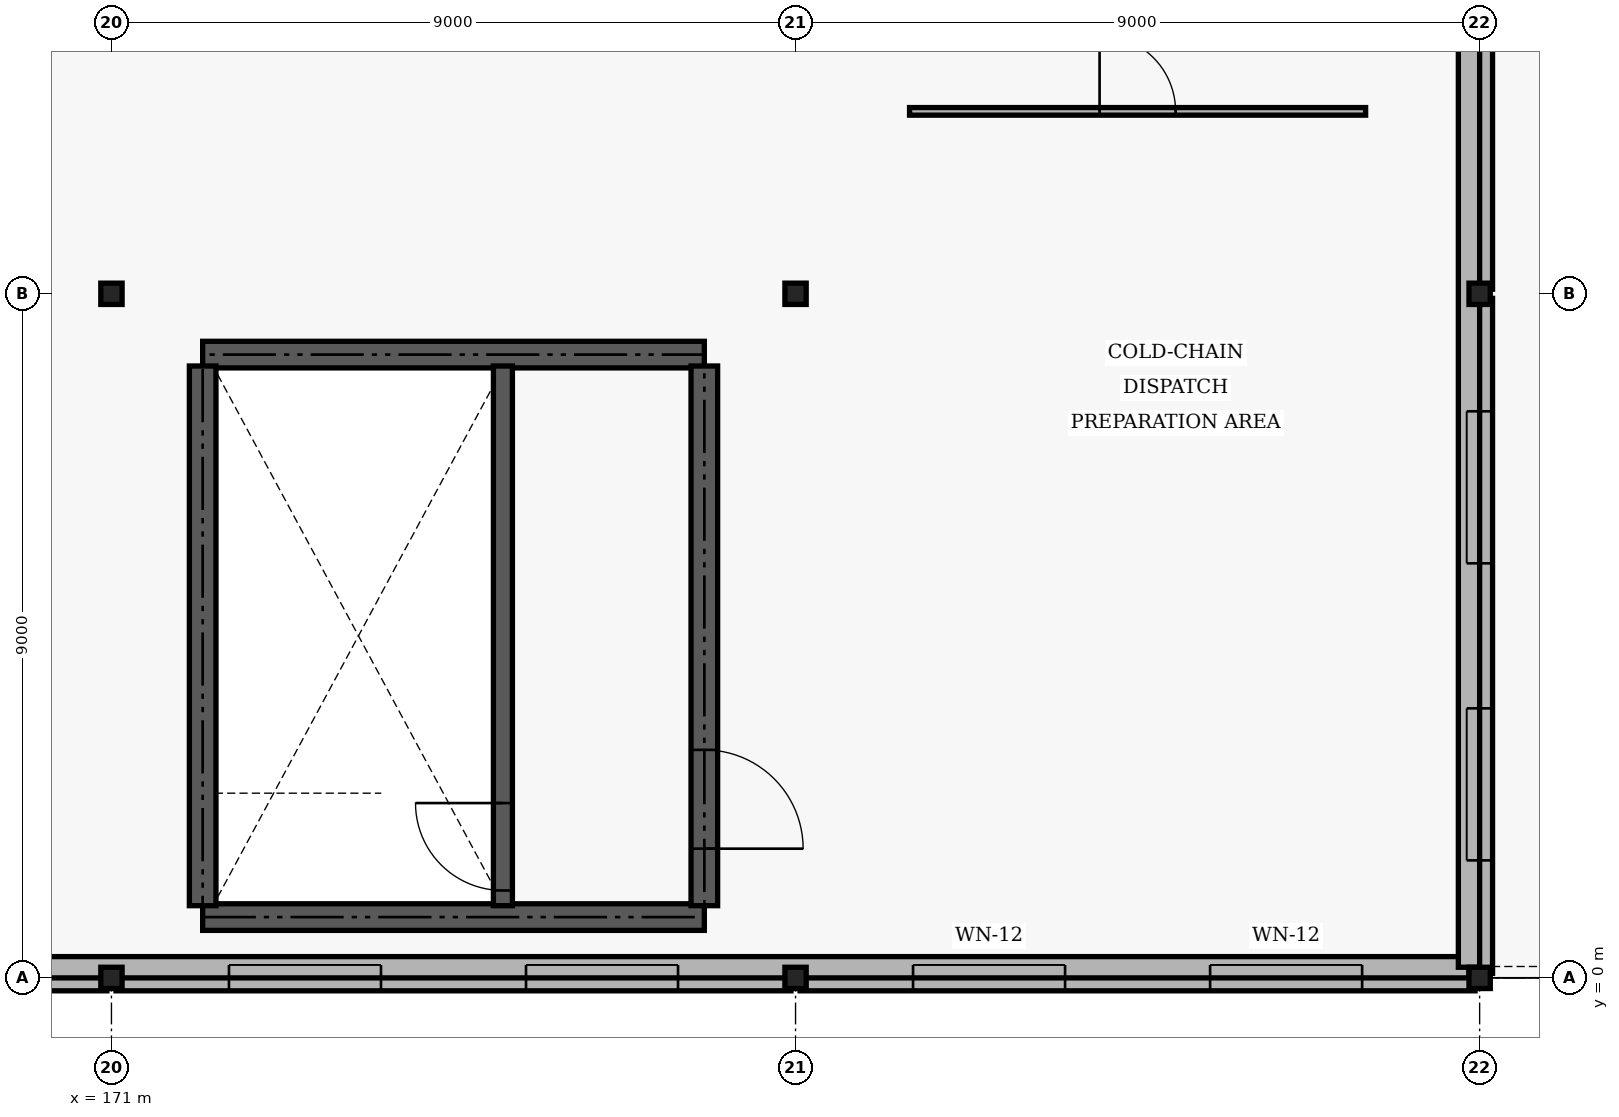
"""IFC4 building model, lengths in metres.
Left out: names, types, materials, properties, quantities, classifications, styles, units other than length and angle.
Written with IfcOpenShell. Run it as: python <this file> out.ifc"""

import sys

from ifc_helpers import new_model, si_unit, direction, frame, frame_2d, origin, origin_2d, place, context, subcontext, project, spatial, rectangle, i_section, extrude, element, fill, save


model = new_model("IFC4")
c1 = context("Model", 3, precision=1e-05, world=origin(), true_north=direction((0.0, 1.0)))
c2 = subcontext(c1, "Body", "Model", "MODEL_VIEW")
j1 = project(units=[si_unit("LENGTHUNIT", "METRE"), si_unit("PLANEANGLEUNIT", "RADIAN")], contexts=[c1])
p1 = place(None, origin())
s1 = spatial("IfcSite", under=j1, at=p1, CompositionType="ELEMENT")
p2 = place(p1, origin())
s2 = spatial("IfcBuilding", under=s1, at=p2, CompositionType="ELEMENT")
p3 = place(p2, frame((0.0, 0.0, 13.5)))
s3 = spatial("IfcBuildingStorey", under=s2, at=p3, CompositionType="ELEMENT", Elevation=13.5)
for number, where, z_axis, x_axis in (
    (1, (171.0, 0.0, 0.0), (0.0, 0.0, 1.0), (1.0, 0.0, 0.0)),
    (2, (171.0, 9.0, 0.0), (0.0, 0.0, 1.0), (1.0, 0.0, 0.0)),
    (3, (180.0, 0.0, 0.0), (0.0, 0.0, 1.0), (1.0, 0.0, 0.0)),
    (4, (180.0, 9.0, 0.0), (0.0, 0.0, 1.0), (1.0, 0.0, 0.0)),
    (5, (189.0, 0.0, 0.0), (0.0, 0.0, 1.0), (1.0, 0.0, 0.0)),
    (6, (189.0, 9.0, 0.0), (0.0, 0.0, 1.0), (1.0, 0.0, 0.0)),
):
    element("IfcColumn", number, at=place(p3, frame(where, z_axis=z_axis, x_axis=x_axis)), inside=s3, PredefinedType="COLUMN", context=c2, shape_type="SweptSolid", body=[
        extrude(i_section(OverallWidth=0.28, OverallDepth=0.28, WebThickness=0.01, FlangeThickness=0.018, FilletRadius=0.024, at=origin_2d()), origin(), (0.0, 0.0, 1.0), 3.9),
    ])
p4 = place(p3, frame((162.06, 0.0, 0.0), z_axis=(0.0, 0.0, 1.0), x_axis=(1.0, 0.0, 0.0)))
e7 = element("IfcWall", 7, at=p4, inside=s3, PredefinedType="SOLIDWALL", context=c2, shape_type="SweptSolid", body=[
    extrude(rectangle(XDim=8.88, YDim=0.34, at=frame_2d((4.44, 0.0))), origin(), (0.0, 0.0, 1.0), 3.2),
])
p5 = place(p4, frame((1.486, 0.0, 0.9)))
e8 = element("IfcOpeningElement", 8, at=p5, cuts=e7, PredefinedType="OPENING", context=c2, shape_type="SweptSolid", body=[
    extrude(rectangle(XDim=2.0, YDim=1.5, at=frame_2d((1.0, 0.75))), frame((0.0, 0.18, 0.0), z_axis=(0.0, -1.0, 0.0), x_axis=(1.0, 0.0, 0.0)), (0.0, 0.0, 1.0), 0.36),
])
p6 = place(p4, frame((5.394, 0.0, 0.9)))
e9 = element("IfcOpeningElement", 9, at=p6, cuts=e7, PredefinedType="OPENING", context=c2, shape_type="SweptSolid", body=[
    extrude(rectangle(XDim=2.0, YDim=1.5, at=frame_2d((1.0, 0.75))), frame((0.0, 0.18, 0.0), z_axis=(0.0, -1.0, 0.0), x_axis=(1.0, 0.0, 0.0)), (0.0, 0.0, 1.0), 0.36),
])
p7 = place(p3, frame((171.06, 0.0, 0.0), z_axis=(0.0, 0.0, 1.0), x_axis=(1.0, 0.0, 0.0)))
e10 = element("IfcWall", 10, at=p7, inside=s3, PredefinedType="SOLIDWALL", context=c2, shape_type="SweptSolid", body=[
    extrude(rectangle(XDim=8.88, YDim=0.34, at=frame_2d((4.44, 0.0))), origin(), (0.0, 0.0, 1.0), 3.2),
])
p8 = place(p7, frame((1.486, 0.0, 0.9)))
e11 = element("IfcOpeningElement", 11, at=p8, cuts=e10, PredefinedType="OPENING", context=c2, shape_type="SweptSolid", body=[
    extrude(rectangle(XDim=2.0, YDim=1.5, at=frame_2d((1.0, 0.75))), frame((0.0, 0.18, 0.0), z_axis=(0.0, -1.0, 0.0), x_axis=(1.0, 0.0, 0.0)), (0.0, 0.0, 1.0), 0.36),
])
p9 = place(p7, frame((5.394, 0.0, 0.9)))
e12 = element("IfcOpeningElement", 12, at=p9, cuts=e10, PredefinedType="OPENING", context=c2, shape_type="SweptSolid", body=[
    extrude(rectangle(XDim=2.0, YDim=1.5, at=frame_2d((1.0, 0.75))), frame((0.0, 0.18, 0.0), z_axis=(0.0, -1.0, 0.0), x_axis=(1.0, 0.0, 0.0)), (0.0, 0.0, 1.0), 0.36),
])
p10 = place(p3, frame((180.06, 0.0, 0.0), z_axis=(0.0, 0.0, 1.0), x_axis=(1.0, 0.0, 0.0)))
e13 = element("IfcWall", 13, at=p10, inside=s3, PredefinedType="SOLIDWALL", context=c2, shape_type="SweptSolid", body=[
    extrude(rectangle(XDim=8.88, YDim=0.34, at=frame_2d((4.44, 0.0))), origin(), (0.0, 0.0, 1.0), 3.2),
])
p11 = place(p10, frame((1.486, 0.0, 0.9)))
e14 = element("IfcOpeningElement", 14, at=p11, cuts=e13, PredefinedType="OPENING", context=c2, shape_type="SweptSolid", body=[
    extrude(rectangle(XDim=2.0, YDim=1.5, at=frame_2d((1.0, 0.75))), frame((0.0, 0.18, 0.0), z_axis=(0.0, -1.0, 0.0), x_axis=(1.0, 0.0, 0.0)), (0.0, 0.0, 1.0), 0.36),
])
p12 = place(p10, frame((5.394, 0.0, 0.9)))
e15 = element("IfcOpeningElement", 15, at=p12, cuts=e13, PredefinedType="OPENING", context=c2, shape_type="SweptSolid", body=[
    extrude(rectangle(XDim=2.0, YDim=1.5, at=frame_2d((1.0, 0.75))), frame((0.0, 0.18, 0.0), z_axis=(0.0, -1.0, 0.0), x_axis=(1.0, 0.0, 0.0)), (0.0, 0.0, 1.0), 0.36),
])
p13 = place(p3, frame((189.0, 0.06, 0.0), z_axis=(0.0, 0.0, 1.0), x_axis=(0.0, 1.0, 0.0)))
e16 = element("IfcWall", 16, at=p13, inside=s3, PredefinedType="SOLIDWALL", context=c2, shape_type="SweptSolid", body=[
    extrude(rectangle(XDim=8.88, YDim=0.34, at=frame_2d((4.44, 0.0))), origin(), (0.0, 0.0, 1.0), 3.2),
])
p14 = place(p13, frame((1.486, 0.0, 0.9)))
e17 = element("IfcOpeningElement", 17, at=p14, cuts=e16, PredefinedType="OPENING", context=c2, shape_type="SweptSolid", body=[
    extrude(rectangle(XDim=2.0, YDim=2.4, at=frame_2d((1.0, 1.2))), frame((0.0, 0.18, 0.0), z_axis=(0.0, -1.0, 0.0), x_axis=(1.0, 0.0, 0.0)), (0.0, 0.0, 1.0), 0.36),
])
p15 = place(p13, frame((5.394, 0.0, 0.9)))
e18 = element("IfcOpeningElement", 18, at=p15, cuts=e16, PredefinedType="OPENING", context=c2, shape_type="SweptSolid", body=[
    extrude(rectangle(XDim=2.0, YDim=2.4, at=frame_2d((1.0, 1.2))), frame((0.0, 0.18, 0.0), z_axis=(0.0, -1.0, 0.0), x_axis=(1.0, 0.0, 0.0)), (0.0, 0.0, 1.0), 0.36),
])
p16 = place(p3, frame((189.0, 9.06, 0.0), z_axis=(0.0, 0.0, 1.0), x_axis=(0.0, 1.0, 0.0)))
e19 = element("IfcWall", 19, at=p16, inside=s3, PredefinedType="SOLIDWALL", context=c2, shape_type="SweptSolid", body=[
    extrude(rectangle(XDim=8.88, YDim=0.34, at=frame_2d((4.44, 0.0))), origin(), (0.0, 0.0, 1.0), 3.2),
])
p17 = place(p16, frame((3.84, 0.0, 0.0)))
e20 = element("IfcOpeningElement", 20, at=p17, cuts=e19, PredefinedType="OPENING", context=c2, shape_type="SweptSolid", body=[
    extrude(rectangle(XDim=1.2, YDim=2.15, at=frame_2d((0.6, 1.075))), frame((0.0, 0.18, 0.0), z_axis=(0.0, -1.0, 0.0), x_axis=(1.0, 0.0, 0.0)), (0.0, 0.0, 1.0), 0.36),
])
p18 = place(p3, frame((135.14, 0.14, 3.9), z_axis=(0.0, 0.0, 1.0), x_axis=(1.0, 0.0, 0.0)))
e21 = element("IfcWall", 21, at=p18, inside=s3, PredefinedType="PARAPET", context=c2, shape_type="SweptSolid", body=[
    extrude(rectangle(XDim=53.72, YDim=0.28, at=frame_2d((26.86, 0.0))), origin(), (0.0, 0.0, 1.0), 1.2),
])
p19 = place(p3, frame((188.86, 0.14, 3.9), z_axis=(0.0, 0.0, 1.0), x_axis=(0.0, 1.0, 0.0)))
e22 = element("IfcWall", 22, at=p19, inside=s3, PredefinedType="PARAPET", context=c2, shape_type="SweptSolid", body=[
    extrude(rectangle(XDim=17.72, YDim=0.28, at=frame_2d((8.86, 0.0))), origin(), (0.0, 0.0, 1.0), 1.2),
])
for number, where, z_axis, x_axis in (
    (23, (172.2, 0.8, 0.0), (0.0, 0.0, 1.0), (1.0, 0.0, 0.0)),
    (24, (172.2, 8.2, 0.0), (0.0, 0.0, 1.0), (1.0, 0.0, 0.0)),
):
    element("IfcWall", number, at=place(p3, frame(where, z_axis=z_axis, x_axis=x_axis)), inside=s3, PredefinedType="SHEAR", context=c2, shape_type="SweptSolid", body=[
        extrude(rectangle(XDim=6.6, YDim=0.35, at=frame_2d((3.3, 0.0))), origin(), (0.0, 0.0, 1.0), 3.7),
    ])
p20 = place(p3, frame((172.2, 0.95, 0.0), z_axis=(0.0, 0.0, 1.0), x_axis=(0.0, 1.0, 0.0)))
e25 = element("IfcWall", 25, at=p20, inside=s3, PredefinedType="SHEAR", context=c2, shape_type="SweptSolid", body=[
    extrude(rectangle(XDim=7.1, YDim=0.35, at=frame_2d((3.55, 0.0))), origin(), (0.0, 0.0, 1.0), 3.7),
])
p21 = place(p3, frame((178.8, 0.95, 0.0), z_axis=(0.0, 0.0, 1.0), x_axis=(0.0, 1.0, 0.0)))
e26 = element("IfcWall", 26, at=p21, inside=s3, PredefinedType="SHEAR", context=c2, shape_type="SweptSolid", body=[
    extrude(rectangle(XDim=7.1, YDim=0.35, at=frame_2d((3.55, 0.0))), origin(), (0.0, 0.0, 1.0), 3.7),
])
p22 = place(p21, frame((0.75, 0.0, 0.0)))
e27 = element("IfcOpeningElement", 27, at=p22, cuts=e26, PredefinedType="OPENING", context=c2, shape_type="SweptSolid", body=[
    extrude(rectangle(XDim=1.3, YDim=2.15, at=frame_2d((0.65, 1.075))), frame((0.0, 0.185, 0.0), z_axis=(0.0, -1.0, 0.0), x_axis=(1.0, 0.0, 0.0)), (0.0, 0.0, 1.0), 0.37),
])
p23 = place(p3, frame((176.15, 0.95, 0.0), z_axis=(0.0, 0.0, 1.0), x_axis=(0.0, 1.0, 0.0)))
e28 = element("IfcWall", 28, at=p23, inside=s3, PredefinedType="SHEAR", context=c2, shape_type="SweptSolid", body=[
    extrude(rectangle(XDim=7.1, YDim=0.25, at=frame_2d((3.55, 0.0))), origin(), (0.0, 0.0, 1.0), 3.7),
])
p24 = place(p23, frame((0.2, 0.0, 0.0)))
e29 = element("IfcOpeningElement", 29, at=p24, cuts=e28, PredefinedType="OPENING", context=c2, shape_type="SweptSolid", body=[
    extrude(rectangle(XDim=1.15, YDim=2.15, at=frame_2d((0.575, 1.075))), frame((0.0, 0.135, 0.0), z_axis=(0.0, -1.0, 0.0), x_axis=(1.0, 0.0, 0.0)), (0.0, 0.0, 1.0), 0.27),
])
p25 = place(p3, frame((181.5, 11.4, 0.0), z_axis=(0.0, 0.0, 1.0), x_axis=(1.0, 0.0, 0.0)))
e30 = element("IfcWall", 30, at=p25, inside=s3, PredefinedType="PARTITIONING", context=c2, shape_type="SweptSolid", body=[
    extrude(rectangle(XDim=6.0, YDim=0.1, at=frame_2d((3.0, 0.0))), origin(), (0.0, 0.0, 1.0), 2.9),
])
p26 = place(p25, frame((2.5, 0.0, 0.0)))
e31 = element("IfcOpeningElement", 31, at=p26, cuts=e30, PredefinedType="OPENING", context=c2, shape_type="SweptSolid", body=[
    extrude(rectangle(XDim=1.0, YDim=2.1, at=frame_2d((0.5, 1.05))), frame((0.0, 0.06, 0.0), z_axis=(0.0, -1.0, 0.0), x_axis=(1.0, 0.0, 0.0)), (0.0, 0.0, 1.0), 0.12),
])
p27 = place(p8, origin())
e32 = element("IfcWindow", 32, at=p27, inside=s3, PartitioningType="SINGLE_PANEL", PredefinedType="WINDOW", context=c2, shape_type="SweptSolid", body=[
    extrude(rectangle(XDim=2.0, YDim=1.5, at=frame_2d((1.0, 0.75))), frame((0.0, 0.03, 0.0), z_axis=(0.0, -1.0, 0.0), x_axis=(1.0, 0.0, 0.0)), (0.0, 0.0, 1.0), 0.06),
])
fill(e11, e32)
p28 = place(p9, origin())
e33 = element("IfcWindow", 33, at=p28, inside=s3, PartitioningType="SINGLE_PANEL", PredefinedType="WINDOW", context=c2, shape_type="SweptSolid", body=[
    extrude(rectangle(XDim=2.0, YDim=1.5, at=frame_2d((1.0, 0.75))), frame((0.0, 0.03, 0.0), z_axis=(0.0, -1.0, 0.0), x_axis=(1.0, 0.0, 0.0)), (0.0, 0.0, 1.0), 0.06),
])
fill(e12, e33)
p29 = place(p11, origin())
e34 = element("IfcWindow", 34, at=p29, inside=s3, PartitioningType="SINGLE_PANEL", PredefinedType="WINDOW", context=c2, shape_type="SweptSolid", body=[
    extrude(rectangle(XDim=2.0, YDim=1.5, at=frame_2d((1.0, 0.75))), frame((0.0, 0.03, 0.0), z_axis=(0.0, -1.0, 0.0), x_axis=(1.0, 0.0, 0.0)), (0.0, 0.0, 1.0), 0.06),
])
fill(e14, e34)
p30 = place(p12, origin())
e35 = element("IfcWindow", 35, at=p30, inside=s3, PartitioningType="SINGLE_PANEL", PredefinedType="WINDOW", context=c2, shape_type="SweptSolid", body=[
    extrude(rectangle(XDim=2.0, YDim=1.5, at=frame_2d((1.0, 0.75))), frame((0.0, 0.03, 0.0), z_axis=(0.0, -1.0, 0.0), x_axis=(1.0, 0.0, 0.0)), (0.0, 0.0, 1.0), 0.06),
])
fill(e15, e35)
p31 = place(p14, origin())
e36 = element("IfcWindow", 36, at=p31, inside=s3, PartitioningType="SINGLE_PANEL", PredefinedType="WINDOW", context=c2, shape_type="SweptSolid", body=[
    extrude(rectangle(XDim=2.0, YDim=2.4, at=frame_2d((1.0, 1.2))), frame((0.0, 0.03, 0.0), z_axis=(0.0, -1.0, 0.0), x_axis=(1.0, 0.0, 0.0)), (0.0, 0.0, 1.0), 0.06),
])
fill(e17, e36)
p32 = place(p15, origin())
e37 = element("IfcWindow", 37, at=p32, inside=s3, PartitioningType="SINGLE_PANEL", PredefinedType="WINDOW", context=c2, shape_type="SweptSolid", body=[
    extrude(rectangle(XDim=2.0, YDim=2.4, at=frame_2d((1.0, 1.2))), frame((0.0, 0.03, 0.0), z_axis=(0.0, -1.0, 0.0), x_axis=(1.0, 0.0, 0.0)), (0.0, 0.0, 1.0), 0.06),
])
fill(e18, e37)
p33 = place(p22, frame((1.3, 0.0, 0.0), z_axis=(0.0, 0.0, 1.0), x_axis=(-1.0, 0.0, 0.0)))
e38 = element("IfcDoor", 38, at=p33, inside=s3, OperationType="DOUBLE_DOOR_SINGLE_SWING", PredefinedType="DOOR", context=c2, shape_type="SweptSolid", body=[
    extrude(rectangle(XDim=1.3, YDim=2.15, at=frame_2d((0.65, 1.075))), frame((0.0, 0.025, 0.0), z_axis=(0.0, -1.0, 0.0), x_axis=(1.0, 0.0, 0.0)), (0.0, 0.0, 1.0), 0.05),
])
fill(e27, e38)
p34 = place(p24, frame((1.15, 0.0, 0.0), z_axis=(0.0, 0.0, 1.0), x_axis=(-1.0, 0.0, 0.0)))
e39 = element("IfcDoor", 39, at=p34, inside=s3, OperationType="SINGLE_SWING_RIGHT", PredefinedType="DOOR", context=c2, shape_type="SweptSolid", body=[
    extrude(rectangle(XDim=1.15, YDim=2.15, at=frame_2d((0.575, 1.075))), frame((0.0, 0.025, 0.0), z_axis=(0.0, -1.0, 0.0), x_axis=(1.0, 0.0, 0.0)), (0.0, 0.0, 1.0), 0.05),
])
fill(e29, e39)
p35 = place(p26, origin())
e40 = element("IfcDoor", 40, at=p35, inside=s3, OperationType="SINGLE_SWING_LEFT", PredefinedType="DOOR", context=c2, shape_type="SweptSolid", body=[
    extrude(rectangle(XDim=1.0, YDim=2.1, at=frame_2d((0.5, 1.05))), frame((0.0, 0.025, 0.0), z_axis=(0.0, -1.0, 0.0), x_axis=(1.0, 0.0, 0.0)), (0.0, 0.0, 1.0), 0.05),
])
fill(e31, e40)
save(model, sys.argv[1])
